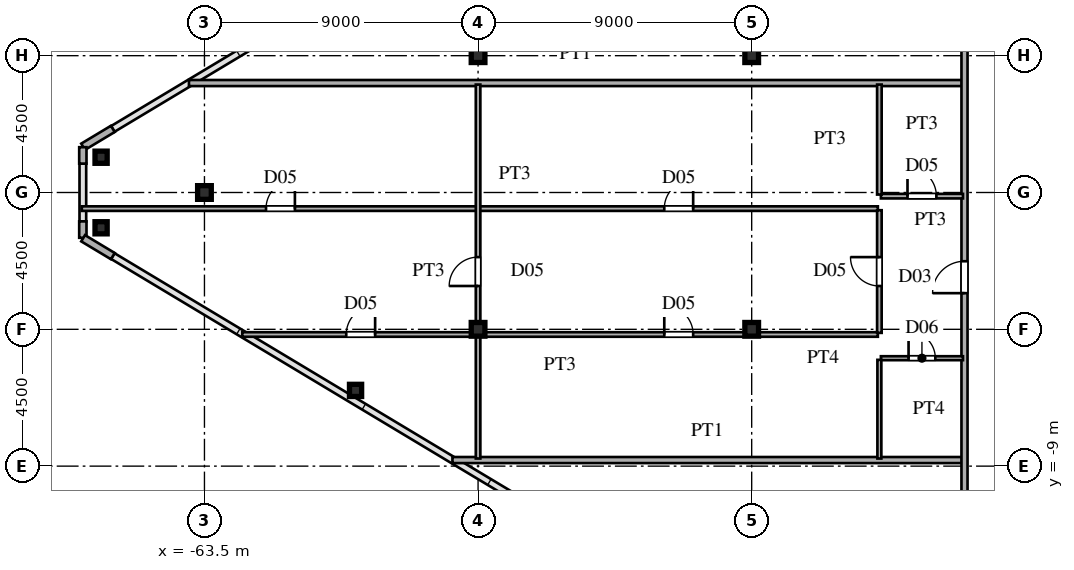
"""IFC4 building model, lengths in metres.
Left out: names, types, materials, properties, quantities, classifications, styles, units other than length and angle.
Written with IfcOpenShell. Run it as: python <this file> out.ifc"""

import sys

from ifc_helpers import new_model, si_unit, direction, frame, frame_2d, origin, origin_2d, place, context, subcontext, project, spatial, rectangle, hollow_rectangle, i_section, extrude, source, transform, mapped, element, fill, save


model = new_model("IFC4")
c1 = context("Model", 3, precision=1e-05, world=origin(), true_north=direction((0.0, 1.0)))
c2 = subcontext(c1, "Body", "Model", "MODEL_VIEW")
j1 = project(units=[si_unit("LENGTHUNIT", "METRE"), si_unit("PLANEANGLEUNIT", "RADIAN")], contexts=[c1])
p1 = place(None, origin())
s1 = spatial("IfcSite", under=j1, at=p1, CompositionType="ELEMENT")
p2 = place(p1, origin())
s2 = spatial("IfcBuilding", under=s1, at=p2, CompositionType="ELEMENT")
p3 = place(p2, frame((0.0, 0.0, 239.4)))
s3 = spatial("IfcBuildingStorey", under=s2, at=p3, CompositionType="ELEMENT", Elevation=239.4)
m1 = source(origin(), c2, "Body", "SweptSolid", [
    extrude(i_section(OverallWidth=0.45, OverallDepth=0.45, WebThickness=0.016, FlangeThickness=0.025, at=origin_2d()), origin(), (0.0, 0.0, 1.0), 3.75),
])
for number, where, z_axis, x_axis in (
    (1, (-45.5, -4.5, 0.0), (0.0, 0.0, 1.0), (1.0, 0.0, 0.0)),
    (2, (-45.5, 4.5, 0.0), (0.0, 0.0, 1.0), (1.0, 0.0, 0.0)),
    (3, (-54.5, -4.5, 0.0), (0.0, 0.0, 1.0), (1.0, 0.0, 0.0)),
    (4, (-54.5, 4.5, 0.0), (0.0, 0.0, 1.0), (1.0, 0.0, 0.0)),
    (5, (-63.5, 0.0, 0.0), (0.0, 0.0, 1.0), (1.0, 0.0, 0.0)),
):
    element("IfcColumn", number, at=place(p3, frame(where, z_axis=z_axis, x_axis=x_axis)), inside=s3, PredefinedType="COLUMN", context=c2, shape_type="MappedRepresentation", body=[
        mapped(m1, transform((0.0, 0.0, 0.0), scale=1.0)),
    ])
m2 = source(origin(), c2, "Body", "SweptSolid", [
    extrude(hollow_rectangle(XDim=0.4, YDim=0.4, WallThickness=0.016, at=origin_2d()), origin(), (0.0, 0.0, 1.0), 3.75),
])
for number, where, z_axis, x_axis in (
    (6, (-66.9, 1.16, 0.0), (0.0, 0.0, 1.0), (1.0, 0.0, 0.0)),
    (7, (-66.9, -1.16, 0.0), (0.0, 0.0, 1.0), (1.0, 0.0, 0.0)),
    (8, (-58.53, -6.509, 0.0), (0.0, 0.0, 1.0), (1.0, 0.0, 0.0)),
):
    element("IfcColumn", number, at=place(p3, frame(where, z_axis=z_axis, x_axis=x_axis)), inside=s3, PredefinedType="COLUMN", context=c2, shape_type="MappedRepresentation", body=[
        mapped(m2, transform((0.0, 0.0, 0.0), scale=1.0)),
    ])
p4 = place(p3, frame((-66.514, 2.092, 0.0), z_axis=(0.0, 0.0, 1.0), x_axis=(-0.85743623509, -0.514590228002, 0.0)))
e9 = element("IfcWall", 9, at=p4, inside=s3, PredefinedType="SOLIDWALL", context=c2, shape_type="SweptSolid", body=[
    extrude(rectangle(XDim=1.14, YDim=0.24, at=frame_2d((0.57, 0.0))), origin(), (0.0, 0.0, 1.0), 3.53),
])
for number, where, z_axis, x_axis in (
    (10, (-67.5, 1.49, 0.0), (0.0, 0.0, 1.0), (0.0, -1.0, 0.0)),
    (11, (-67.5, -0.95, 0.0), (0.0, 0.0, 1.0), (0.0, -1.0, 0.0)),
):
    element("IfcWall", number, at=place(p3, frame(where, z_axis=z_axis, x_axis=x_axis)), inside=s3, PredefinedType="SOLIDWALL", context=c2, shape_type="SweptSolid", body=[
        extrude(rectangle(XDim=0.54, YDim=0.24, at=frame_2d((0.27, 0.0))), origin(), (0.0, 0.0, 1.0), 3.53),
    ])
p5 = place(p3, frame((-67.491, -1.505, 0.0), z_axis=(0.0, 0.0, 1.0), x_axis=(0.85743623509, -0.514590228002, 0.0)))
e12 = element("IfcWall", 12, at=p5, inside=s3, PredefinedType="SOLIDWALL", context=c2, shape_type="SweptSolid", body=[
    extrude(rectangle(XDim=1.14, YDim=0.24, at=frame_2d((0.57, 0.0))), origin(), (0.0, 0.0, 1.0), 3.53),
])
p6 = place(p3, frame((-55.343, -8.8, 0.0), z_axis=(0.0, 0.0, 1.0), x_axis=(1.0, 0.0, 0.0)))
e13 = element("IfcWall", 13, at=p6, inside=s3, PredefinedType="PARTITIONING", context=c2, shape_type="SweptSolid", body=[
    extrude(rectangle(XDim=16.763, YDim=0.2, at=frame_2d((8.381, 0.0))), origin(), (0.0, 0.0, 1.0), 3.53),
])
p7 = place(p3, frame((-41.25, -5.45, 0.0), z_axis=(0.0, 0.0, 1.0), x_axis=(1.0, 0.0, 0.0)))
e14 = element("IfcWall", 14, at=p7, inside=s3, PredefinedType="PARTITIONING", context=c2, shape_type="SweptSolid", body=[
    extrude(rectangle(XDim=2.7, YDim=0.13, at=frame_2d((1.35, 0.0))), origin(), (0.0, 0.0, 1.0), 3.53),
])
p8 = place(p7, frame((0.91, 0.0, 0.0)))
e15 = element("IfcOpeningElement", 15, at=p8, cuts=e14, PredefinedType="OPENING", context=c2, shape_type="SweptSolid", body=[
    extrude(rectangle(XDim=0.88, YDim=2.1, at=frame_2d((0.44, 1.05))), frame((0.0, 0.075, 0.0), z_axis=(0.0, -1.0, 0.0), x_axis=(1.0, 0.0, 0.0)), (0.0, 0.0, 1.0), 0.15),
])
p9 = place(p3, frame((-62.257, -4.67, 0.0), z_axis=(0.0, 0.0, 1.0), x_axis=(1.0, 0.0, 0.0)))
e16 = element("IfcWall", 16, at=p9, inside=s3, PredefinedType="PARTITIONING", context=c2, shape_type="SweptSolid", body=[
    extrude(rectangle(XDim=20.907, YDim=0.15, at=frame_2d((10.454, 0.0))), origin(), (0.0, 0.0, 1.0), 3.53),
])
p10 = place(p9, frame((13.882, 0.0, 0.0)))
e17 = element("IfcOpeningElement", 17, at=p10, cuts=e16, PredefinedType="OPENING", context=c2, shape_type="SweptSolid", body=[
    extrude(rectangle(XDim=0.95, YDim=2.15, at=frame_2d((0.475, 1.075))), frame((0.0, 0.085, 0.0), z_axis=(0.0, -1.0, 0.0), x_axis=(1.0, 0.0, 0.0)), (0.0, 0.0, 1.0), 0.17),
])
p11 = place(p9, frame((3.421, 0.0, 0.0)))
e18 = element("IfcOpeningElement", 18, at=p11, cuts=e16, PredefinedType="OPENING", context=c2, shape_type="SweptSolid", body=[
    extrude(rectangle(XDim=0.95, YDim=2.15, at=frame_2d((0.475, 1.075))), frame((0.0, 0.085, 0.0), z_axis=(0.0, -1.0, 0.0), x_axis=(1.0, 0.0, 0.0)), (0.0, 0.0, 1.0), 0.17),
])
p12 = place(p3, frame((-67.535, -0.53, 0.0), z_axis=(0.0, 0.0, 1.0), x_axis=(1.0, 0.0, 0.0)))
e19 = element("IfcWall", 19, at=p12, inside=s3, PredefinedType="PARTITIONING", context=c2, shape_type="SweptSolid", body=[
    extrude(rectangle(XDim=26.185, YDim=0.15, at=frame_2d((13.092, 0.0))), origin(), (0.0, 0.0, 1.0), 3.53),
])
p13 = place(p12, frame((19.16, 0.0, 0.0)))
e20 = element("IfcOpeningElement", 20, at=p13, cuts=e19, PredefinedType="OPENING", context=c2, shape_type="SweptSolid", body=[
    extrude(rectangle(XDim=0.95, YDim=2.15, at=frame_2d((0.475, 1.075))), frame((0.0, 0.085, 0.0), z_axis=(0.0, -1.0, 0.0), x_axis=(1.0, 0.0, 0.0)), (0.0, 0.0, 1.0), 0.17),
])
p14 = place(p12, frame((6.06, 0.0, 0.0)))
e21 = element("IfcOpeningElement", 21, at=p14, cuts=e19, PredefinedType="OPENING", context=c2, shape_type="SweptSolid", body=[
    extrude(rectangle(XDim=0.95, YDim=2.15, at=frame_2d((0.475, 1.075))), frame((0.0, 0.085, 0.0), z_axis=(0.0, -1.0, 0.0), x_axis=(1.0, 0.0, 0.0)), (0.0, 0.0, 1.0), 0.17),
])
p15 = place(p3, frame((-41.25, -0.12, 0.0), z_axis=(0.0, 0.0, 1.0), x_axis=(1.0, 0.0, 0.0)))
e22 = element("IfcWall", 22, at=p15, inside=s3, PredefinedType="PARTITIONING", context=c2, shape_type="SweptSolid", body=[
    extrude(rectangle(XDim=2.7, YDim=0.15, at=frame_2d((1.35, 0.0))), origin(), (0.0, 0.0, 1.0), 3.53),
])
p16 = place(p15, frame((0.875, 0.0, 0.0)))
e23 = element("IfcOpeningElement", 23, at=p16, cuts=e22, PredefinedType="OPENING", context=c2, shape_type="SweptSolid", body=[
    extrude(rectangle(XDim=0.95, YDim=2.15, at=frame_2d((0.475, 1.075))), frame((0.0, 0.085, 0.0), z_axis=(0.0, -1.0, 0.0), x_axis=(1.0, 0.0, 0.0)), (0.0, 0.0, 1.0), 0.17),
])
p17 = place(p3, frame((-64.01, 3.6, 0.0), z_axis=(0.0, 0.0, 1.0), x_axis=(1.0, 0.0, 0.0)))
e24 = element("IfcWall", 24, at=p17, inside=s3, PredefinedType="PARTITIONING", context=c2, shape_type="SweptSolid", body=[
    extrude(rectangle(XDim=25.43, YDim=0.2, at=frame_2d((12.715, 0.0))), origin(), (0.0, 0.0, 1.0), 3.53),
])
p18 = place(p3, frame((-54.5, -8.75, 0.0), z_axis=(0.0, 0.0, 1.0), x_axis=(0.0, 1.0, 0.0)))
e25 = element("IfcWall", 25, at=p18, inside=s3, PredefinedType="PARTITIONING", context=c2, shape_type="SweptSolid", body=[
    extrude(rectangle(XDim=12.3, YDim=0.15, at=frame_2d((6.15, 0.0))), origin(), (0.0, 0.0, 1.0), 2.93),
])
p19 = place(p18, frame((5.675, 0.0, 0.0)))
e26 = element("IfcOpeningElement", 26, at=p19, cuts=e25, PredefinedType="OPENING", context=c2, shape_type="SweptSolid", body=[
    extrude(rectangle(XDim=0.95, YDim=2.15, at=frame_2d((0.475, 1.075))), frame((0.0, 0.085, 0.0), z_axis=(0.0, -1.0, 0.0), x_axis=(1.0, 0.0, 0.0)), (0.0, 0.0, 1.0), 0.17),
])
p20 = place(p3, frame((-41.3, -8.75, 0.0), z_axis=(0.0, 0.0, 1.0), x_axis=(0.0, 1.0, 0.0)))
e27 = element("IfcWall", 27, at=p20, inside=s3, PredefinedType="PARTITIONING", context=c2, shape_type="SweptSolid", body=[
    extrude(rectangle(XDim=3.246, YDim=0.13, at=frame_2d((1.623, 0.0))), origin(), (0.0, 0.0, 1.0), 3.53),
])
p21 = place(p3, frame((-41.3, -4.617, 0.0), z_axis=(0.0, 0.0, 1.0), x_axis=(0.0, 1.0, 0.0)))
e28 = element("IfcWall", 28, at=p21, inside=s3, PredefinedType="PARTITIONING", context=c2, shape_type="SweptSolid", body=[
    extrude(rectangle(XDim=4.034, YDim=0.15, at=frame_2d((2.017, 0.0))), origin(), (0.0, 0.0, 1.0), 3.53),
])
p22 = place(p21, frame((1.542, 0.0, 0.0)))
e29 = element("IfcOpeningElement", 29, at=p22, cuts=e28, PredefinedType="OPENING", context=c2, shape_type="SweptSolid", body=[
    extrude(rectangle(XDim=0.95, YDim=2.15, at=frame_2d((0.475, 1.075))), frame((0.0, 0.085, 0.0), z_axis=(0.0, -1.0, 0.0), x_axis=(1.0, 0.0, 0.0)), (0.0, 0.0, 1.0), 0.17),
])
p23 = place(p3, frame((-41.3, -0.068, 0.0), z_axis=(0.0, 0.0, 1.0), x_axis=(0.0, 1.0, 0.0)))
e30 = element("IfcWall", 30, at=p23, inside=s3, PredefinedType="PARTITIONING", context=c2, shape_type="SweptSolid", body=[
    extrude(rectangle(XDim=3.618, YDim=0.15, at=frame_2d((1.809, 0.0))), origin(), (0.0, 0.0, 1.0), 3.53),
])
p24 = place(p3, frame((-38.5, -15.515, 0.0), z_axis=(0.0, 0.0, 1.0), x_axis=(0.0, 1.0, 0.0)))
e31 = element("IfcWall", 31, at=p24, inside=s3, PredefinedType="PARTITIONING", context=c2, shape_type="SweptSolid", body=[
    extrude(rectangle(XDim=31.03, YDim=0.2, at=frame_2d((15.515, 0.0))), origin(), (0.0, 0.0, 1.0), 3.53),
])
p25 = place(p24, frame((2.79, 0.0, 0.0)))
e32 = element("IfcOpeningElement", 32, at=p25, cuts=e31, PredefinedType="OPENING", context=c2, shape_type="SweptSolid", body=[
    extrude(rectangle(XDim=1.05, YDim=2.25, at=frame_2d((0.525, 1.125))), frame((0.0, 0.11, 0.0), z_axis=(0.0, -1.0, 0.0), x_axis=(1.0, 0.0, 0.0)), (0.0, 0.0, 1.0), 0.22),
])
p26 = place(p24, frame((12.204, 0.0, 0.0)))
e33 = element("IfcOpeningElement", 33, at=p26, cuts=e31, PredefinedType="OPENING", context=c2, shape_type="SweptSolid", body=[
    extrude(rectangle(XDim=1.05, YDim=2.25, at=frame_2d((0.525, 1.125))), frame((0.0, 0.11, 0.0), z_axis=(0.0, -1.0, 0.0), x_axis=(1.0, 0.0, 0.0)), (0.0, 0.0, 1.0), 0.22),
])
p27 = place(p24, frame((24.59, 0.0, 0.0)))
e34 = element("IfcOpeningElement", 34, at=p27, cuts=e31, PredefinedType="OPENING", context=c2, shape_type="SweptSolid", body=[
    extrude(rectangle(XDim=1.05, YDim=2.25, at=frame_2d((0.525, 1.125))), frame((0.0, 0.11, 0.0), z_axis=(0.0, -1.0, 0.0), x_axis=(1.0, 0.0, 0.0)), (0.0, 0.0, 1.0), 0.22),
])
m3 = source(origin(), c2, "Body", "SweptSolid", [
    extrude(rectangle(XDim=0.88, YDim=2.1, at=frame_2d((0.44, 1.05))), frame((0.0, 0.025, 0.0), z_axis=(0.0, -1.0, 0.0), x_axis=(1.0, 0.0, 0.0)), (0.0, 0.0, 1.0), 0.05),
])
p28 = place(p8, origin())
e35 = element("IfcDoor", 35, at=p28, inside=s3, OperationType="SINGLE_SWING_LEFT", PredefinedType="DOOR", context=c2, shape_type="MappedRepresentation", body=[
    mapped(m3, transform((0.0, 0.0, 0.0), scale=1.0)),
])
fill(e15, e35)
m4 = source(origin(), c2, "Body", "SweptSolid", [
    extrude(rectangle(XDim=0.95, YDim=2.15, at=frame_2d((0.475, 1.075))), frame((0.0, 0.025, 0.0), z_axis=(0.0, -1.0, 0.0), x_axis=(1.0, 0.0, 0.0)), (0.0, 0.0, 1.0), 0.05),
])
p29 = place(p10, origin())
e36 = element("IfcDoor", 36, at=p29, inside=s3, OperationType="SINGLE_SWING_LEFT", PredefinedType="DOOR", context=c2, shape_type="MappedRepresentation", body=[
    mapped(m4, transform((0.0, 0.0, 0.0), scale=1.0)),
])
fill(e17, e36)
p30 = place(p11, origin())
e37 = element("IfcDoor", 37, at=p30, inside=s3, OperationType="SINGLE_SWING_RIGHT", PredefinedType="DOOR", context=c2, shape_type="MappedRepresentation", body=[
    mapped(m4, transform((0.0, 0.0, 0.0), scale=1.0)),
])
fill(e18, e37)
p31 = place(p13, origin())
e38 = element("IfcDoor", 38, at=p31, inside=s3, OperationType="SINGLE_SWING_RIGHT", PredefinedType="DOOR", context=c2, shape_type="MappedRepresentation", body=[
    mapped(m4, transform((0.0, 0.0, 0.0), scale=1.0)),
])
fill(e20, e38)
p32 = place(p14, origin())
e39 = element("IfcDoor", 39, at=p32, inside=s3, OperationType="SINGLE_SWING_RIGHT", PredefinedType="DOOR", context=c2, shape_type="MappedRepresentation", body=[
    mapped(m4, transform((0.0, 0.0, 0.0), scale=1.0)),
])
fill(e21, e39)
p33 = place(p16, origin())
e40 = element("IfcDoor", 40, at=p33, inside=s3, OperationType="SINGLE_SWING_LEFT", PredefinedType="DOOR", context=c2, shape_type="MappedRepresentation", body=[
    mapped(m4, transform((0.0, 0.0, 0.0), scale=1.0)),
])
fill(e23, e40)
p34 = place(p19, origin())
e41 = element("IfcDoor", 41, at=p34, inside=s3, OperationType="SINGLE_SWING_LEFT", PredefinedType="DOOR", context=c2, shape_type="MappedRepresentation", body=[
    mapped(m4, transform((0.0, 0.0, 0.0), scale=1.0)),
])
fill(e26, e41)
p35 = place(p22, origin())
e42 = element("IfcDoor", 42, at=p35, inside=s3, OperationType="SINGLE_SWING_RIGHT", PredefinedType="DOOR", context=c2, shape_type="MappedRepresentation", body=[
    mapped(m4, transform((0.0, 0.0, 0.0), scale=1.0)),
])
fill(e29, e42)
m5 = source(origin(), c2, "Body", "SweptSolid", [
    extrude(rectangle(XDim=1.05, YDim=2.25, at=frame_2d((0.525, 1.125))), frame((0.0, 0.025, 0.0), z_axis=(0.0, -1.0, 0.0), x_axis=(1.0, 0.0, 0.0)), (0.0, 0.0, 1.0), 0.05),
])
p36 = place(p26, origin())
e43 = element("IfcDoor", 43, at=p36, inside=s3, OperationType="SINGLE_SWING_LEFT", PredefinedType="DOOR", context=c2, shape_type="MappedRepresentation", body=[
    mapped(m5, transform((0.0, 0.0, 0.0), scale=1.0)),
])
fill(e33, e43)
save(model, sys.argv[1])
